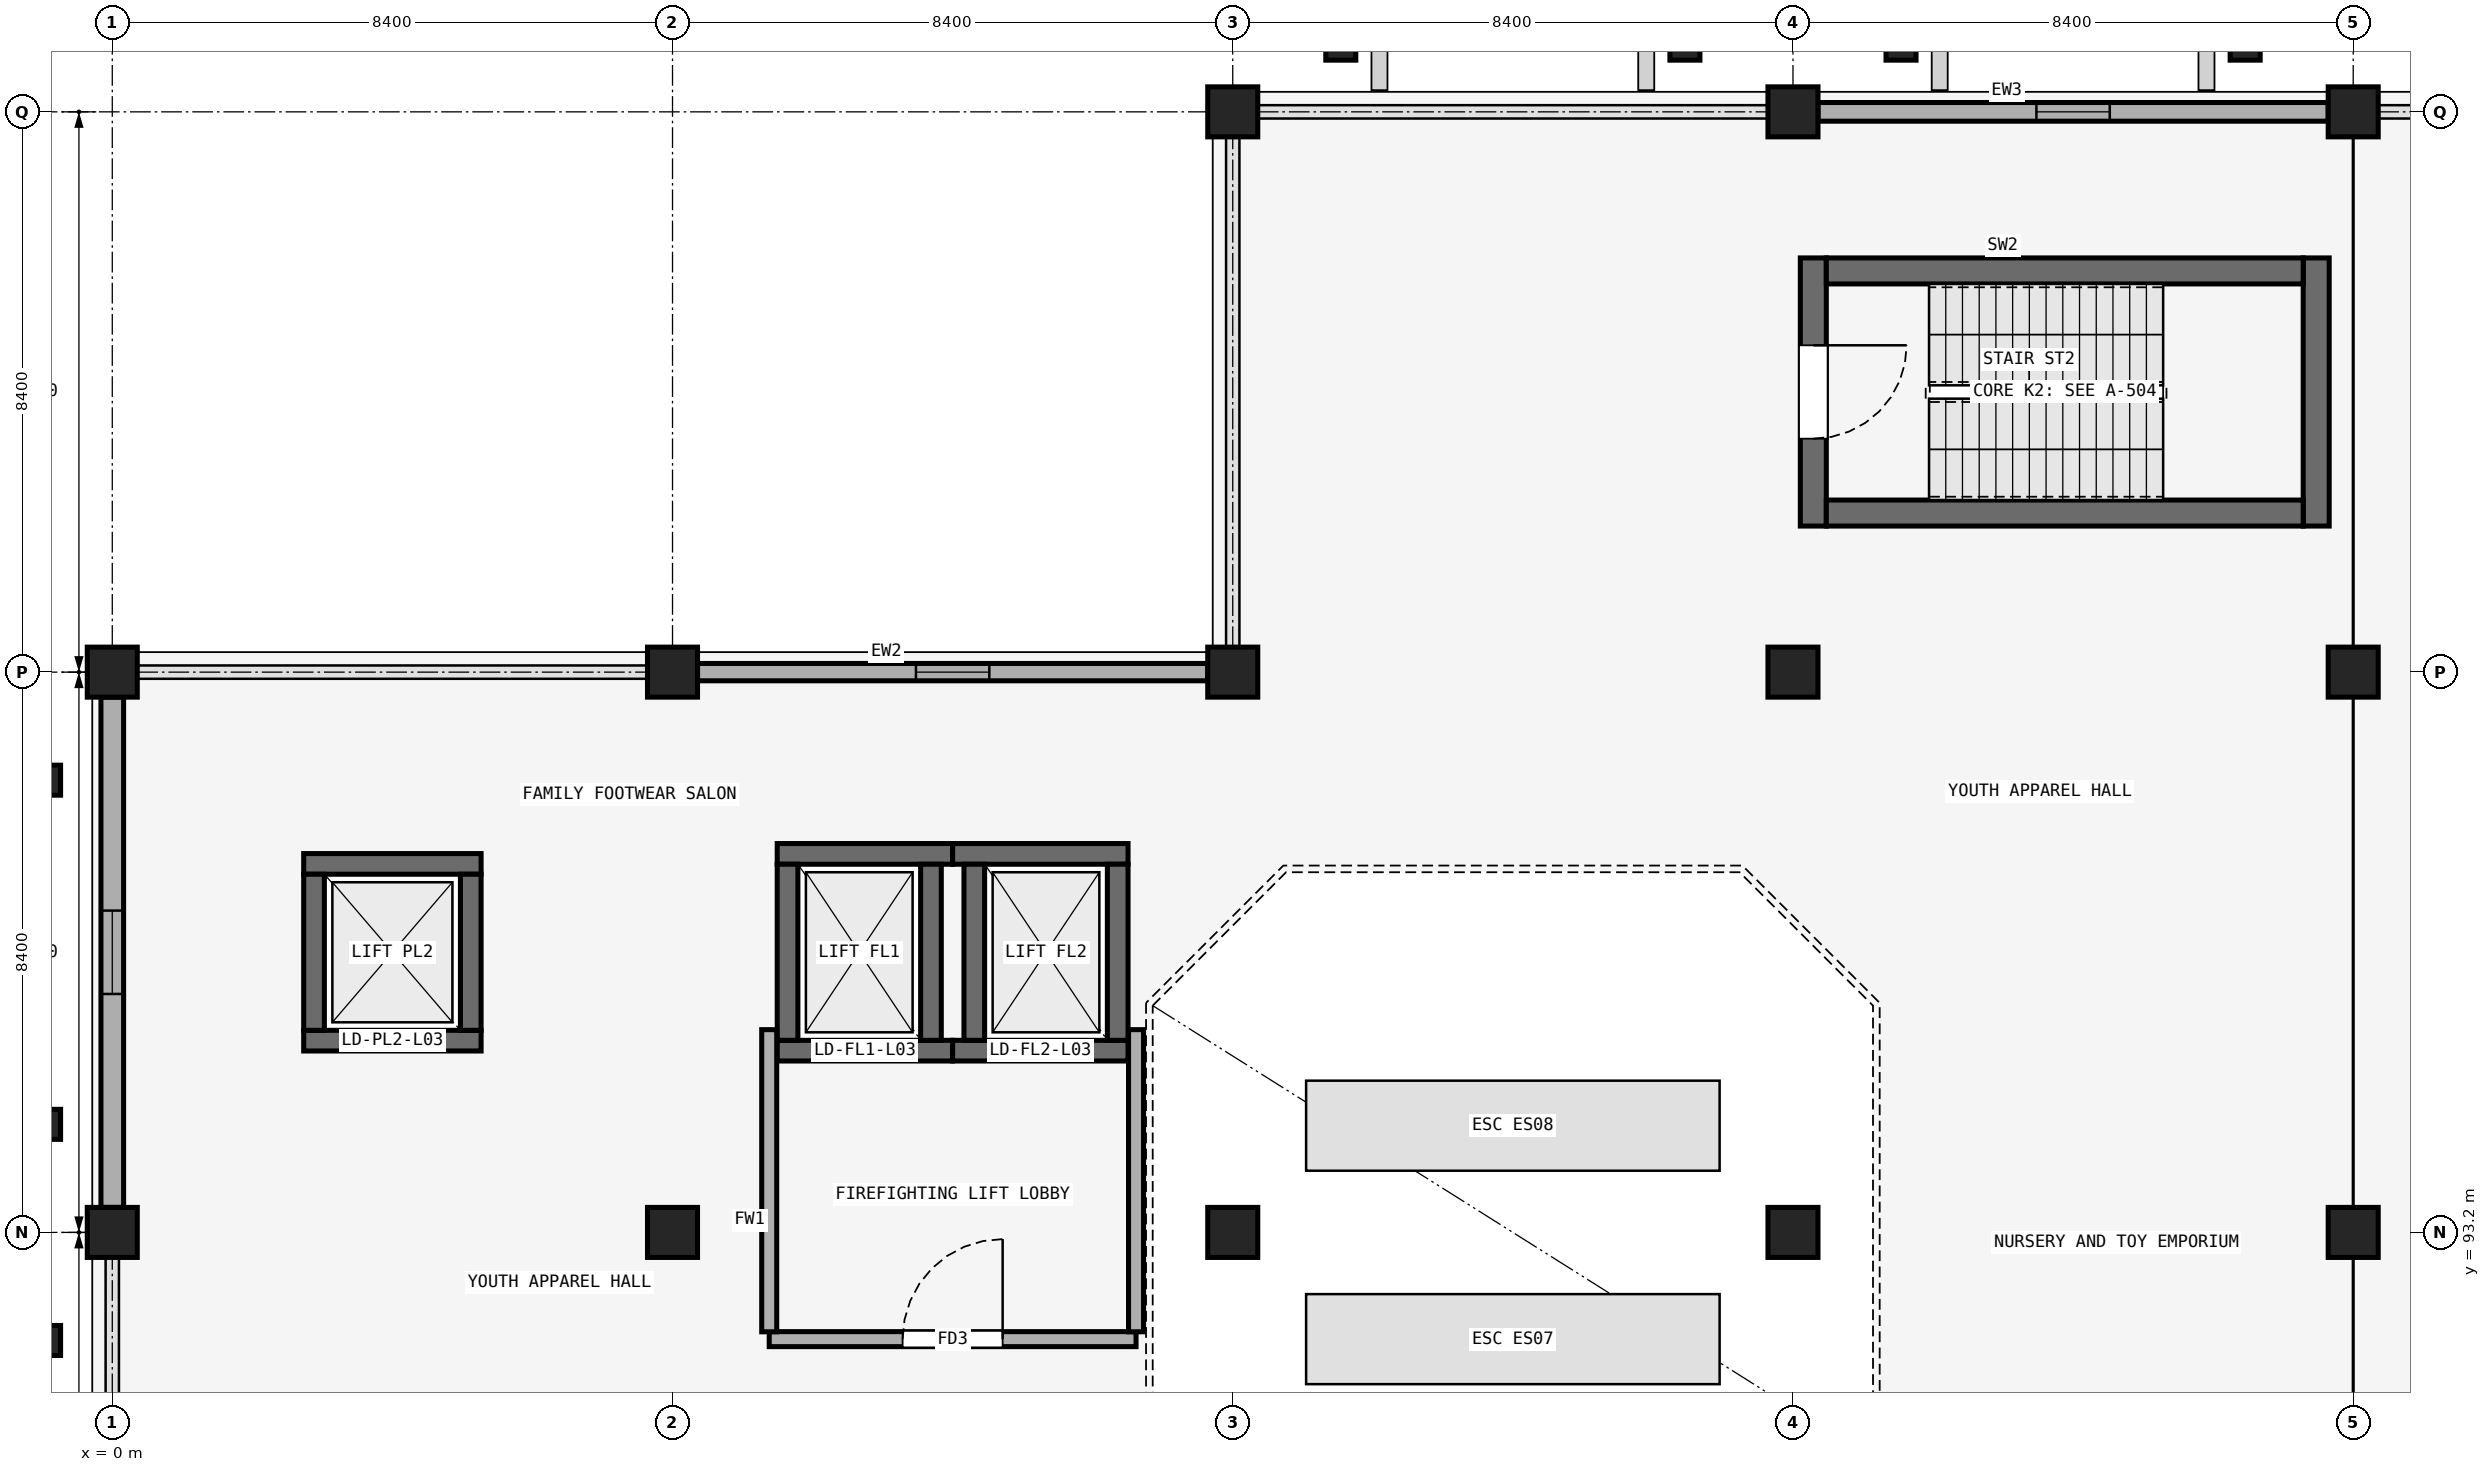
"""IFC4 building model, lengths in metres.
Left out: names, types, materials, properties, quantities, classifications, styles, units other than length and angle.
Written with IfcOpenShell. Run it as: python <this file> out.ifc"""

import sys

from ifc_helpers import new_model, si_unit, direction, frame, frame_2d, origin, origin_2d, place, context, subcontext, project, spatial, rectangle, extrude, element, fill, save


model = new_model("IFC4")
c1 = context("Model", 3, precision=1e-05, world=origin(), true_north=direction((0.0, 1.0)))
c2 = subcontext(c1, "Body", "Model", "MODEL_VIEW")
j1 = project(units=[si_unit("LENGTHUNIT", "METRE"), si_unit("PLANEANGLEUNIT", "RADIAN")], contexts=[c1])
p1 = place(None, origin())
s1 = spatial("IfcSite", under=j1, at=p1, CompositionType="ELEMENT")
p2 = place(p1, origin())
s2 = spatial("IfcBuilding", under=s1, at=p2, CompositionType="ELEMENT")
p3 = place(p2, frame((0.0, 0.0, 14.4)))
s3 = spatial("IfcBuildingStorey", under=s2, at=p3, CompositionType="ELEMENT", Elevation=14.4)
for number, where, z_axis, x_axis in (
    (1, (0.0, 93.2, 0.0), (0.0, 0.0, 1.0), (1.0, 0.0, 0.0)),
    (2, (8.4, 93.2, 0.0), (0.0, 0.0, 1.0), (1.0, 0.0, 0.0)),
    (3, (16.8, 93.2, 0.0), (0.0, 0.0, 1.0), (1.0, 0.0, 0.0)),
    (4, (25.2, 93.2, 0.0), (0.0, 0.0, 1.0), (1.0, 0.0, 0.0)),
    (5, (33.6, 93.2, 0.0), (0.0, 0.0, 1.0), (1.0, 0.0, 0.0)),
    (6, (0.0, 101.6, 0.0), (0.0, 0.0, 1.0), (1.0, 0.0, 0.0)),
    (7, (8.4, 101.6, 0.0), (0.0, 0.0, 1.0), (1.0, 0.0, 0.0)),
    (8, (16.8, 101.6, 0.0), (0.0, 0.0, 1.0), (1.0, 0.0, 0.0)),
    (9, (25.2, 101.6, 0.0), (0.0, 0.0, 1.0), (1.0, 0.0, 0.0)),
    (10, (33.6, 101.6, 0.0), (0.0, 0.0, 1.0), (1.0, 0.0, 0.0)),
    (11, (16.8, 110.0, 0.0), (0.0, 0.0, 1.0), (1.0, 0.0, 0.0)),
    (12, (25.2, 110.0, 0.0), (0.0, 0.0, 1.0), (1.0, 0.0, 0.0)),
    (13, (33.6, 110.0, 0.0), (0.0, 0.0, 1.0), (1.0, 0.0, 0.0)),
):
    element("IfcColumn", number, at=place(p3, frame(where, z_axis=z_axis, x_axis=x_axis)), inside=s3, PredefinedType="COLUMN", context=c2, shape_type="SweptSolid", body=[
        extrude(rectangle(XDim=0.75, YDim=0.75, at=origin_2d()), origin(), (0.0, 0.0, 1.0), 4.5),
    ])
for number, where, z_axis, x_axis in (
    (14, (18.42, 111.05, 0.0), (0.0, 0.0, 1.0), (1.0, 0.0, 0.0)),
    (15, (23.58, 111.05, 0.0), (0.0, 0.0, 1.0), (1.0, 0.0, 0.0)),
    (16, (26.82, 111.05, 0.0), (0.0, 0.0, 1.0), (1.0, 0.0, 0.0)),
    (17, (31.98, 111.05, 0.0), (0.0, 0.0, 1.0), (1.0, 0.0, 0.0)),
    (18, (-1.05, 91.58, 0.0), (0.0, 0.0, 1.0), (0.0, 1.0, 0.0)),
    (19, (-1.05, 94.82, 0.0), (0.0, 0.0, 1.0), (0.0, 1.0, 0.0)),
    (20, (-1.05, 99.98, 0.0), (0.0, 0.0, 1.0), (0.0, 1.0, 0.0)),
):
    element("IfcColumn", number, at=place(p3, frame(where, z_axis=z_axis, x_axis=x_axis)), inside=s3, PredefinedType="PILASTER", context=c2, shape_type="SweptSolid", body=[
        extrude(rectangle(XDim=0.45, YDim=0.55, at=origin_2d()), origin(), (0.0, 0.0, 1.0), 4.5),
    ])
p4 = place(p3, frame((8.775, 101.6, 0.0), z_axis=(0.0, 0.0, 1.0), x_axis=(1.0, 0.0, 0.0)))
e21 = element("IfcWall", 21, at=p4, inside=s3, PredefinedType="SOLIDWALL", context=c2, shape_type="SweptSolid", body=[
    extrude(rectangle(XDim=7.65, YDim=0.26, at=frame_2d((3.825, 0.0))), origin(), (0.0, 0.0, 1.0), 3.45),
])
p5 = place(p4, frame((3.275, 0.0, 0.95)))
e22 = element("IfcOpeningElement", 22, at=p5, cuts=e21, PredefinedType="OPENING", context=c2, shape_type="SweptSolid", body=[
    extrude(rectangle(XDim=1.1, YDim=1.6, at=frame_2d((0.55, 0.8))), frame((0.0, 0.14, 0.0), z_axis=(0.0, -1.0, 0.0), x_axis=(1.0, 0.0, 0.0)), (0.0, 0.0, 1.0), 0.28),
])
p6 = place(p3, frame((25.575, 110.0, 0.0), z_axis=(0.0, 0.0, 1.0), x_axis=(1.0, 0.0, 0.0)))
e23 = element("IfcWall", 23, at=p6, inside=s3, PredefinedType="SOLIDWALL", context=c2, shape_type="SweptSolid", body=[
    extrude(rectangle(XDim=7.65, YDim=0.28, at=frame_2d((3.825, 0.0))), origin(), (0.0, 0.0, 1.0), 3.45),
])
p7 = place(p6, frame((3.275, 0.0, 0.95)))
e24 = element("IfcOpeningElement", 24, at=p7, cuts=e23, PredefinedType="OPENING", context=c2, shape_type="SweptSolid", body=[
    extrude(rectangle(XDim=1.1, YDim=1.85, at=frame_2d((0.55, 0.925))), frame((0.0, 0.15, 0.0), z_axis=(0.0, -1.0, 0.0), x_axis=(1.0, 0.0, 0.0)), (0.0, 0.0, 1.0), 0.3),
])
p8 = place(p3, frame((0.0, 93.575, 0.0), z_axis=(0.0, 0.0, 1.0), x_axis=(0.0, 1.0, 0.0)))
e25 = element("IfcWall", 25, at=p8, inside=s3, PredefinedType="SOLIDWALL", context=c2, shape_type="SweptSolid", body=[
    extrude(rectangle(XDim=7.65, YDim=0.34, at=frame_2d((3.825, 0.0))), origin(), (0.0, 0.0, 1.0), 3.45),
])
p9 = place(p8, frame((3.2, 0.0, 0.95)))
e26 = element("IfcOpeningElement", 26, at=p9, cuts=e25, PredefinedType="OPENING", context=c2, shape_type="SweptSolid", body=[
    extrude(rectangle(XDim=1.25, YDim=1.6, at=frame_2d((0.625, 0.8))), frame((0.0, 0.18, 0.0), z_axis=(0.0, -1.0, 0.0), x_axis=(1.0, 0.0, 0.0)), (0.0, 0.0, 1.0), 0.36),
])
p10 = place(p3, frame((25.505, 107.81, 0.0), z_axis=(0.0, 0.0, 1.0), x_axis=(0.0, -1.0, 0.0)))
e27 = element("IfcWall", 27, at=p10, inside=s3, PredefinedType="SHEAR", context=c2, shape_type="SweptSolid", body=[
    extrude(rectangle(XDim=4.02, YDim=0.39, at=frame_2d((2.01, 0.0))), origin(), (0.0, 0.0, 1.0), 4.2),
])
p11 = place(p10, frame((1.31, 0.0, 0.0)))
e28 = element("IfcOpeningElement", 28, at=p11, cuts=e27, PredefinedType="OPENING", context=c2, shape_type="SweptSolid", body=[
    extrude(rectangle(XDim=1.4, YDim=2.15, at=frame_2d((0.7, 1.075))), frame((0.0, 0.205, 0.0), z_axis=(0.0, -1.0, 0.0), x_axis=(1.0, 0.0, 0.0)), (0.0, 0.0, 1.0), 0.41),
])
p12 = place(p3, frame((33.045, 103.79, 0.0), z_axis=(0.0, 0.0, 1.0), x_axis=(0.0, 1.0, 0.0)))
e29 = element("IfcWall", 29, at=p12, inside=s3, PredefinedType="SHEAR", context=c2, shape_type="SweptSolid", body=[
    extrude(rectangle(XDim=4.02, YDim=0.39, at=frame_2d((2.01, 0.0))), origin(), (0.0, 0.0, 1.0), 4.2),
])
for number, where, z_axis, x_axis in (
    (30, (25.7, 103.985, 0.0), (0.0, 0.0, 1.0), (1.0, 0.0, 0.0)),
    (31, (25.7, 107.615, 0.0), (0.0, 0.0, 1.0), (1.0, 0.0, 0.0)),
):
    element("IfcWall", number, at=place(p3, frame(where, z_axis=z_axis, x_axis=x_axis)), inside=s3, PredefinedType="SHEAR", context=c2, shape_type="SweptSolid", body=[
        extrude(rectangle(XDim=7.15, YDim=0.39, at=frame_2d((3.575, 0.0))), origin(), (0.0, 0.0, 1.0), 4.2),
    ])
p13 = place(p3, frame((9.97, 95.925, 0.0), z_axis=(0.0, 0.0, 1.0), x_axis=(1.0, 0.0, 0.0)))
e32 = element("IfcWall", 32, at=p13, inside=s3, PredefinedType="SHEAR", context=c2, shape_type="SweptSolid", body=[
    extrude(rectangle(XDim=2.63, YDim=0.31, at=frame_2d((1.315, 0.0))), origin(), (0.0, 0.0, 1.0), 4.2),
])
p14 = place(p13, frame((0.715, 0.0, 0.0)))
e33 = element("IfcOpeningElement", 33, at=p14, cuts=e32, PredefinedType="OPENING", context=c2, shape_type="SweptSolid", body=[
    extrude(rectangle(XDim=1.2, YDim=2.25, at=frame_2d((0.6, 1.125))), frame((0.0, 0.165, 0.0), z_axis=(0.0, -1.0, 0.0), x_axis=(1.0, 0.0, 0.0)), (0.0, 0.0, 1.0), 0.33),
])
p15 = place(p3, frame((9.97, 98.875, 0.0), z_axis=(0.0, 0.0, 1.0), x_axis=(1.0, 0.0, 0.0)))
e34 = element("IfcWall", 34, at=p15, inside=s3, PredefinedType="SHEAR", context=c2, shape_type="SweptSolid", body=[
    extrude(rectangle(XDim=2.63, YDim=0.31, at=frame_2d((1.315, 0.0))), origin(), (0.0, 0.0, 1.0), 4.2),
])
for number, where, z_axis, x_axis in (
    (35, (10.125, 96.08, 0.0), (0.0, 0.0, 1.0), (0.0, 1.0, 0.0)),
    (36, (12.275, 96.08, 0.0), (0.0, 0.0, 1.0), (0.0, 1.0, 0.0)),
):
    element("IfcWall", number, at=place(p3, frame(where, z_axis=z_axis, x_axis=x_axis)), inside=s3, PredefinedType="SHEAR", context=c2, shape_type="SweptSolid", body=[
        extrude(rectangle(XDim=2.64, YDim=0.31, at=frame_2d((1.32, 0.0))), origin(), (0.0, 0.0, 1.0), 4.2),
    ])
p16 = place(p3, frame((12.6, 95.925, 0.0), z_axis=(0.0, 0.0, 1.0), x_axis=(1.0, 0.0, 0.0)))
e37 = element("IfcWall", 37, at=p16, inside=s3, PredefinedType="SHEAR", context=c2, shape_type="SweptSolid", body=[
    extrude(rectangle(XDim=2.63, YDim=0.31, at=frame_2d((1.315, 0.0))), origin(), (0.0, 0.0, 1.0), 4.2),
])
p17 = place(p16, frame((0.715, 0.0, 0.0)))
e38 = element("IfcOpeningElement", 38, at=p17, cuts=e37, PredefinedType="OPENING", context=c2, shape_type="SweptSolid", body=[
    extrude(rectangle(XDim=1.2, YDim=2.25, at=frame_2d((0.6, 1.125))), frame((0.0, 0.165, 0.0), z_axis=(0.0, -1.0, 0.0), x_axis=(1.0, 0.0, 0.0)), (0.0, 0.0, 1.0), 0.33),
])
p18 = place(p3, frame((12.6, 98.875, 0.0), z_axis=(0.0, 0.0, 1.0), x_axis=(1.0, 0.0, 0.0)))
e39 = element("IfcWall", 39, at=p18, inside=s3, PredefinedType="SHEAR", context=c2, shape_type="SweptSolid", body=[
    extrude(rectangle(XDim=2.63, YDim=0.31, at=frame_2d((1.315, 0.0))), origin(), (0.0, 0.0, 1.0), 4.2),
])
for number, where, z_axis, x_axis in (
    (40, (12.925, 96.08, 0.0), (0.0, 0.0, 1.0), (0.0, 1.0, 0.0)),
    (41, (15.075, 96.08, 0.0), (0.0, 0.0, 1.0), (0.0, 1.0, 0.0)),
):
    element("IfcWall", number, at=place(p3, frame(where, z_axis=z_axis, x_axis=x_axis)), inside=s3, PredefinedType="SHEAR", context=c2, shape_type="SweptSolid", body=[
        extrude(rectangle(XDim=2.64, YDim=0.31, at=frame_2d((1.32, 0.0))), origin(), (0.0, 0.0, 1.0), 4.2),
    ])
p19 = place(p3, frame((2.87, 96.075, 0.0), z_axis=(0.0, 0.0, 1.0), x_axis=(1.0, 0.0, 0.0)))
e42 = element("IfcWall", 42, at=p19, inside=s3, PredefinedType="SHEAR", context=c2, shape_type="SweptSolid", body=[
    extrude(rectangle(XDim=2.66, YDim=0.31, at=frame_2d((1.33, 0.0))), origin(), (0.0, 0.0, 1.0), 4.2),
])
p20 = place(p19, frame((0.78, 0.0, 0.0)))
e43 = element("IfcOpeningElement", 43, at=p20, cuts=e42, PredefinedType="OPENING", context=c2, shape_type="SweptSolid", body=[
    extrude(rectangle(XDim=1.1, YDim=2.2, at=frame_2d((0.55, 1.1))), frame((0.0, 0.165, 0.0), z_axis=(0.0, -1.0, 0.0), x_axis=(1.0, 0.0, 0.0)), (0.0, 0.0, 1.0), 0.33),
])
p21 = place(p3, frame((2.87, 98.725, 0.0), z_axis=(0.0, 0.0, 1.0), x_axis=(1.0, 0.0, 0.0)))
e44 = element("IfcWall", 44, at=p21, inside=s3, PredefinedType="SHEAR", context=c2, shape_type="SweptSolid", body=[
    extrude(rectangle(XDim=2.66, YDim=0.31, at=frame_2d((1.33, 0.0))), origin(), (0.0, 0.0, 1.0), 4.2),
])
for number, where, z_axis, x_axis in (
    (45, (3.025, 96.23, 0.0), (0.0, 0.0, 1.0), (0.0, 1.0, 0.0)),
    (46, (5.375, 96.23, 0.0), (0.0, 0.0, 1.0), (0.0, 1.0, 0.0)),
):
    element("IfcWall", number, at=place(p3, frame(where, z_axis=z_axis, x_axis=x_axis)), inside=s3, PredefinedType="SHEAR", context=c2, shape_type="SweptSolid", body=[
        extrude(rectangle(XDim=2.34, YDim=0.31, at=frame_2d((1.17, 0.0))), origin(), (0.0, 0.0, 1.0), 4.2),
    ])
p22 = place(p3, frame((9.85, 91.6, 0.0), z_axis=(0.0, 0.0, 1.0), x_axis=(1.0, 0.0, 0.0)))
e47 = element("IfcWall", 47, at=p22, inside=s3, PredefinedType="PARTITIONING", context=c2, shape_type="SweptSolid", body=[
    extrude(rectangle(XDim=5.5, YDim=0.225, at=frame_2d((2.75, 0.0))), origin(), (0.0, 0.0, 1.0), 4.2),
])
p23 = place(p22, frame((2.0, 0.0, 0.0)))
e48 = element("IfcOpeningElement", 48, at=p23, cuts=e47, PredefinedType="OPENING", context=c2, shape_type="SweptSolid", body=[
    extrude(rectangle(XDim=1.5, YDim=2.25, at=frame_2d((0.75, 1.125))), frame((0.0, 0.123, 0.0), z_axis=(0.0, -1.0, 0.0), x_axis=(1.0, 0.0, 0.0)), (0.0, 0.0, 1.0), 0.245),
])
for number, where, z_axis, x_axis in (
    (49, (9.85, 91.71, 0.0), (0.0, 0.0, 1.0), (0.0, 1.0, 0.0)),
    (50, (15.35, 91.71, 0.0), (0.0, 0.0, 1.0), (0.0, 1.0, 0.0)),
):
    element("IfcWall", number, at=place(p3, frame(where, z_axis=z_axis, x_axis=x_axis)), inside=s3, PredefinedType="PARTITIONING", context=c2, shape_type="SweptSolid", body=[
        extrude(rectangle(XDim=4.53, YDim=0.225, at=frame_2d((2.265, 0.0))), origin(), (0.0, 0.0, 1.0), 3.5),
    ])
p24 = place(p5, origin())
e51 = element("IfcWindow", 51, at=p24, inside=s3, PartitioningType="SINGLE_PANEL", PredefinedType="WINDOW", context=c2, shape_type="SweptSolid", body=[
    extrude(rectangle(XDim=1.1, YDim=1.6, at=frame_2d((0.55, 0.8))), frame((0.0, 0.03, 0.0), z_axis=(0.0, -1.0, 0.0), x_axis=(1.0, 0.0, 0.0)), (0.0, 0.0, 1.0), 0.06),
])
fill(e22, e51)
p25 = place(p7, origin())
e52 = element("IfcWindow", 52, at=p25, inside=s3, PartitioningType="SINGLE_PANEL", PredefinedType="WINDOW", context=c2, shape_type="SweptSolid", body=[
    extrude(rectangle(XDim=1.1, YDim=1.85, at=frame_2d((0.55, 0.925))), frame((0.0, 0.03, 0.0), z_axis=(0.0, -1.0, 0.0), x_axis=(1.0, 0.0, 0.0)), (0.0, 0.0, 1.0), 0.06),
])
fill(e24, e52)
p26 = place(p9, origin())
e53 = element("IfcWindow", 53, at=p26, inside=s3, PartitioningType="SINGLE_PANEL", PredefinedType="WINDOW", context=c2, shape_type="SweptSolid", body=[
    extrude(rectangle(XDim=1.25, YDim=1.6, at=frame_2d((0.625, 0.8))), frame((0.0, 0.03, 0.0), z_axis=(0.0, -1.0, 0.0), x_axis=(1.0, 0.0, 0.0)), (0.0, 0.0, 1.0), 0.06),
])
fill(e26, e53)
p27 = place(p11, origin())
e54 = element("IfcDoor", 54, at=p27, inside=s3, OperationType="SINGLE_SWING_LEFT", PredefinedType="DOOR", context=c2, shape_type="SweptSolid", body=[
    extrude(rectangle(XDim=1.4, YDim=2.15, at=frame_2d((0.7, 1.075))), frame((0.0, 0.025, 0.0), z_axis=(0.0, -1.0, 0.0), x_axis=(1.0, 0.0, 0.0)), (0.0, 0.0, 1.0), 0.05),
])
fill(e28, e54)
p28 = place(p14, origin())
e55 = element("IfcDoor", 55, at=p28, inside=s3, OperationType="SLIDING_TO_LEFT", PredefinedType="DOOR", context=c2, shape_type="SweptSolid", body=[
    extrude(rectangle(XDim=1.2, YDim=2.25, at=frame_2d((0.6, 1.125))), frame((0.0, 0.025, 0.0), z_axis=(0.0, -1.0, 0.0), x_axis=(1.0, 0.0, 0.0)), (0.0, 0.0, 1.0), 0.05),
])
fill(e33, e55)
p29 = place(p17, origin())
e56 = element("IfcDoor", 56, at=p29, inside=s3, OperationType="SLIDING_TO_LEFT", PredefinedType="DOOR", context=c2, shape_type="SweptSolid", body=[
    extrude(rectangle(XDim=1.2, YDim=2.25, at=frame_2d((0.6, 1.125))), frame((0.0, 0.025, 0.0), z_axis=(0.0, -1.0, 0.0), x_axis=(1.0, 0.0, 0.0)), (0.0, 0.0, 1.0), 0.05),
])
fill(e38, e56)
p30 = place(p20, origin())
e57 = element("IfcDoor", 57, at=p30, inside=s3, OperationType="SLIDING_TO_LEFT", PredefinedType="DOOR", context=c2, shape_type="SweptSolid", body=[
    extrude(rectangle(XDim=1.1, YDim=2.2, at=frame_2d((0.55, 1.1))), frame((0.0, 0.025, 0.0), z_axis=(0.0, -1.0, 0.0), x_axis=(1.0, 0.0, 0.0)), (0.0, 0.0, 1.0), 0.05),
])
fill(e43, e57)
p31 = place(p23, origin())
e58 = element("IfcDoor", 58, at=p31, inside=s3, OperationType="SINGLE_SWING_RIGHT", PredefinedType="DOOR", context=c2, shape_type="SweptSolid", body=[
    extrude(rectangle(XDim=1.5, YDim=2.25, at=frame_2d((0.75, 1.125))), frame((0.0, 0.025, 0.0), z_axis=(0.0, -1.0, 0.0), x_axis=(1.0, 0.0, 0.0)), (0.0, 0.0, 1.0), 0.05),
])
fill(e48, e58)
save(model, sys.argv[1])
